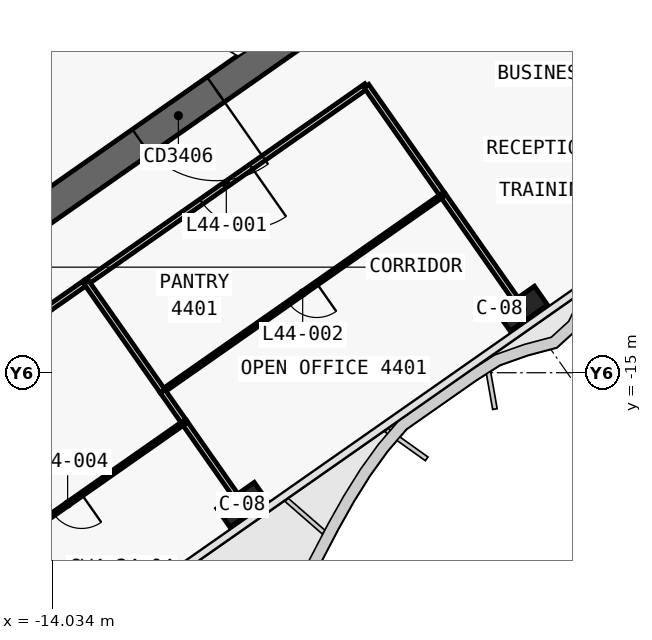
"""IFC4 building model, lengths in metres.
Left out: names, types, materials, properties, quantities, classifications, styles, units other than length and angle.
Written with IfcOpenShell. Run it as: python <this file> out.ifc"""

import sys

from ifc_helpers import new_model, si_unit, direction, frame, frame_2d, origin, origin_2d, place, context, subcontext, project, spatial, polyline, rectangle, outline, extrude, element, fill, save


model = new_model("IFC4")
c1 = context("Model", 3, precision=1e-05, world=origin(), true_north=direction((0.0, 1.0)))
c2 = subcontext(c1, "Body", "Model", "MODEL_VIEW")
j1 = project(units=[si_unit("LENGTHUNIT", "METRE"), si_unit("PLANEANGLEUNIT", "RADIAN")], contexts=[c1])
p1 = place(None, origin())
s1 = spatial("IfcSite", under=j1, at=p1, CompositionType="ELEMENT")
p2 = place(p1, origin())
s2 = spatial("IfcBuilding", under=s1, at=p2, CompositionType="ELEMENT")
p3 = place(p2, frame((0.0, 0.0, 190.5)))
s3 = spatial("IfcBuildingStorey", under=s2, at=p3, CompositionType="ELEMENT", Elevation=190.5)
p4 = place(p3, frame((0.029, 11.984, 0.0), z_axis=(0.0, 0.0, 1.0), x_axis=(-0.819151382952, -0.573577380837, 0.0)))
e1 = element("IfcWall", 1, at=p4, inside=s3, PredefinedType="SHEAR", context=c2, shape_type="SweptSolid", body=[
    extrude(outline(polyline([(33.898, 0.4), (0.56, 0.4), (-0.0, -0.4), (33.898, -0.4), (33.898, 0.4)])), origin(), (0.0, 0.0, 1.0), 3.9),
])
p5 = place(p3, frame((0.029, -0.712, 0.0), z_axis=(0.0, 0.0, 1.0), x_axis=(-0.819151758019, -0.573576845187, 0.0)))
e2 = element("IfcWall", 2, at=p5, inside=s3, PredefinedType="SHEAR", context=c2, shape_type="SweptSolid", body=[
    extrude(outline(polyline([(26.616, 0.4), (0.56, 0.4), (-0.0, -0.4), (26.616, -0.4), (26.616, 0.4)])), origin(), (0.0, 0.0, 1.0), 3.9),
])
p6 = place(p5, frame((2.966, 0.0, 0.0)))
e3 = element("IfcOpeningElement", 3, at=p6, cuts=e2, PredefinedType="OPENING", context=c2, shape_type="SweptSolid", body=[
    extrude(rectangle(XDim=2.4, YDim=2.1, at=frame_2d((1.2, 1.05))), frame((0.0, 0.41, 0.0), z_axis=(0.0, -1.0, 0.0), x_axis=(1.0, 0.0, 0.0)), (0.0, 0.0, 1.0), 0.82),
])
p7 = place(p5, frame((11.916, 0.0, 0.0)))
e4 = element("IfcOpeningElement", 4, at=p7, cuts=e2, PredefinedType="OPENING", context=c2, shape_type="SweptSolid", body=[
    extrude(rectangle(XDim=2.4, YDim=2.1, at=frame_2d((1.2, 1.05))), frame((0.0, 0.41, 0.0), z_axis=(0.0, -1.0, 0.0), x_axis=(1.0, 0.0, 0.0)), (0.0, 0.0, 1.0), 0.82),
])
p8 = place(p3, frame((-2.638, 3.768, 0.0), z_axis=(0.0, 0.0, 1.0), x_axis=(-0.81915267502, -0.573575535572, 0.0)))
e5 = element("IfcWall", 5, at=p8, inside=s3, PredefinedType="SHEAR", context=c2, shape_type="SweptSolid", body=[
    extrude(outline(polyline([(26.2, 0.2), (0.0, 0.2), (0.0, -0.2), (26.2, -0.2), (26.2, 0.2)])), origin(), (0.0, 0.0, 1.0), 3.9),
])
p9 = place(p8, frame((1.169, 0.0, 0.0)))
e6 = element("IfcOpeningElement", 6, at=p9, cuts=e5, PredefinedType="OPENING", context=c2, shape_type="SweptSolid", body=[
    extrude(rectangle(XDim=1.1, YDim=2.1, at=frame_2d((0.55, 1.05))), frame((0.0, 0.21, 0.0), z_axis=(0.0, -1.0, 0.0), x_axis=(1.0, 0.0, 0.0)), (0.0, 0.0, 1.0), 0.42),
])
p10 = place(p8, frame((3.206, 0.0, 0.0)))
e7 = element("IfcOpeningElement", 7, at=p10, cuts=e5, PredefinedType="OPENING", context=c2, shape_type="SweptSolid", body=[
    extrude(rectangle(XDim=1.1, YDim=2.1, at=frame_2d((0.55, 1.05))), frame((0.0, 0.21, 0.0), z_axis=(0.0, -1.0, 0.0), x_axis=(1.0, 0.0, 0.0)), (0.0, 0.0, 1.0), 0.42),
])
p11 = place(p8, frame((5.244, 0.0, 0.0)))
e8 = element("IfcOpeningElement", 8, at=p11, cuts=e5, PredefinedType="OPENING", context=c2, shape_type="SweptSolid", body=[
    extrude(rectangle(XDim=1.1, YDim=2.1, at=frame_2d((0.55, 1.05))), frame((0.0, 0.21, 0.0), z_axis=(0.0, -1.0, 0.0), x_axis=(1.0, 0.0, 0.0)), (0.0, 0.0, 1.0), 0.42),
])
p12 = place(p8, frame((7.281, 0.0, 0.0)))
e9 = element("IfcOpeningElement", 9, at=p12, cuts=e5, PredefinedType="OPENING", context=c2, shape_type="SweptSolid", body=[
    extrude(rectangle(XDim=1.1, YDim=2.1, at=frame_2d((0.55, 1.05))), frame((0.0, 0.21, 0.0), z_axis=(0.0, -1.0, 0.0), x_axis=(1.0, 0.0, 0.0)), (0.0, 0.0, 1.0), 0.42),
])
p13 = place(p8, frame((9.688, 0.0, 0.0)))
e10 = element("IfcOpeningElement", 10, at=p13, cuts=e5, PredefinedType="OPENING", context=c2, shape_type="SweptSolid", body=[
    extrude(rectangle(XDim=1.1, YDim=2.1, at=frame_2d((0.55, 1.05))), frame((0.0, 0.21, 0.0), z_axis=(0.0, -1.0, 0.0), x_axis=(1.0, 0.0, 0.0)), (0.0, 0.0, 1.0), 0.42),
])
p14 = place(p8, frame((11.863, 0.0, 0.0)))
e11 = element("IfcOpeningElement", 11, at=p14, cuts=e5, PredefinedType="OPENING", context=c2, shape_type="SweptSolid", body=[
    extrude(rectangle(XDim=1.1, YDim=2.1, at=frame_2d((0.55, 1.05))), frame((0.0, 0.21, 0.0), z_axis=(0.0, -1.0, 0.0), x_axis=(1.0, 0.0, 0.0)), (0.0, 0.0, 1.0), 0.42),
])
p15 = place(p8, frame((15.175, 0.0, 0.0)))
e12 = element("IfcOpeningElement", 12, at=p15, cuts=e5, PredefinedType="OPENING", context=c2, shape_type="SweptSolid", body=[
    extrude(rectangle(XDim=1.0, YDim=2.1, at=frame_2d((0.5, 1.05))), frame((0.0, 0.21, 0.0), z_axis=(0.0, -1.0, 0.0), x_axis=(1.0, 0.0, 0.0)), (0.0, 0.0, 1.0), 0.42),
])
for number, where, z_axis, x_axis in (
    (13, (-1.665, -13.313, 0.0), (0.0, 0.0, 1.0), (-0.819, -0.574, 0.0)),
    (14, (-9.038, -18.475, 0.0), (0.0, 0.0, 1.0), (-0.819, -0.574, 0.0)),
):
    element("IfcColumn", number, at=place(p3, frame(where, z_axis=z_axis, x_axis=x_axis)), inside=s3, PredefinedType="COLUMN", context=c2, shape_type="SweptSolid", body=[
        extrude(rectangle(XDim=1.2, YDim=0.6, at=origin_2d()), origin(), (0.0, 0.0, 1.0), 3.9),
    ])
p16 = place(p3, frame((-5.766, -7.456, 0.0), z_axis=(0.0, 0.0, 1.0), x_axis=(-0.81915291695, -0.57357519006, 0.0)))
e15 = element("IfcWall", 15, at=p16, inside=s3, PredefinedType="PARTITIONING", context=c2, shape_type="SweptSolid", body=[
    extrude(rectangle(XDim=9.002, YDim=0.15, at=frame_2d((4.501, 0.0))), origin(), (0.0, 0.0, 1.0), 3.0),
])
p17 = place(p16, frame((3.701, 0.0, 0.0)))
e16 = element("IfcOpeningElement", 16, at=p17, cuts=e15, PredefinedType="OPENING", context=c2, shape_type="SweptSolid", body=[
    extrude(rectangle(XDim=1.6, YDim=2.1, at=frame_2d((0.8, 1.05))), frame((0.0, 0.085, 0.0), z_axis=(0.0, -1.0, 0.0), x_axis=(1.0, 0.0, 0.0)), (0.0, 0.0, 1.0), 0.17),
])
p18 = place(p3, frame((-13.137, -12.617, 0.0), z_axis=(0.0, 0.0, 1.0), x_axis=(-0.819153958035, -0.573573703229, 0.0)))
e17 = element("IfcWall", 17, at=p18, inside=s3, PredefinedType="PARTITIONING", context=c2, shape_type="SweptSolid", body=[
    extrude(rectangle(XDim=7.504, YDim=0.15, at=frame_2d((3.752, 0.0))), origin(), (0.0, 0.0, 1.0), 3.0),
])
p19 = place(p18, frame((2.952, 0.0, 0.0)))
e18 = element("IfcOpeningElement", 18, at=p19, cuts=e17, PredefinedType="OPENING", context=c2, shape_type="SweptSolid", body=[
    extrude(rectangle(XDim=1.6, YDim=2.1, at=frame_2d((0.8, 1.05))), frame((0.0, 0.085, 0.0), z_axis=(0.0, -1.0, 0.0), x_axis=(1.0, 0.0, 0.0)), (0.0, 0.0, 1.0), 0.17),
])
p20 = place(p3, frame((-1.849, -13.051, 0.0), z_axis=(0.0, 0.0, 1.0), x_axis=(-0.573600070244, 0.819135495151, 0.0)))
e19 = element("IfcWall", 19, at=p20, inside=s3, PredefinedType="PARTITIONING", context=c2, shape_type="SweptSolid", body=[
    extrude(rectangle(XDim=3.331, YDim=0.15, at=frame_2d((1.666, 0.0))), origin(), (0.0, 0.0, 1.0), 3.0),
])
p21 = place(p3, frame((-3.758, -10.324, 0.0), z_axis=(0.0, 0.0, 1.0), x_axis=(-0.573560539213, 0.819163175355, 0.0)))
e20 = element("IfcWall", 20, at=p21, inside=s3, PredefinedType="PARTITIONING", context=c2, shape_type="SweptSolid", body=[
    extrude(rectangle(XDim=3.504, YDim=0.15, at=frame_2d((1.752, 0.0))), origin(), (0.0, 0.0, 1.0), 3.0),
])
p22 = place(p3, frame((-3.758, -10.324, 0.0), z_axis=(0.0, 0.0, 1.0), x_axis=(-0.819154173185, -0.573573395961, 0.0)))
e21 = element("IfcWall", 21, at=p22, inside=s3, PredefinedType="PARTITIONING", context=c2, shape_type="SweptSolid", body=[
    extrude(rectangle(XDim=9.0, YDim=0.1, at=frame_2d((4.5, 0.0))), origin(), (0.0, 0.0, 1.0), 3.0),
])
p23 = place(p22, frame((4.05, 0.0, 0.0)))
e22 = element("IfcOpeningElement", 22, at=p23, cuts=e21, PredefinedType="OPENING", context=c2, shape_type="SweptSolid", body=[
    extrude(rectangle(XDim=0.9, YDim=2.1, at=frame_2d((0.45, 1.05))), frame((0.0, 0.06, 0.0), z_axis=(0.0, -1.0, 0.0), x_axis=(1.0, 0.0, 0.0)), (0.0, 0.0, 1.0), 0.12),
])
p24 = place(p3, frame((-9.221, -18.213, 0.0), z_axis=(0.0, 0.0, 1.0), x_axis=(-0.573553724287, 0.819167946978, 0.0)))
e23 = element("IfcWall", 23, at=p24, inside=s3, PredefinedType="PARTITIONING", context=c2, shape_type="SweptSolid", body=[
    extrude(rectangle(XDim=2.331, YDim=0.15, at=frame_2d((1.166, 0.0))), origin(), (0.0, 0.0, 1.0), 3.0),
])
p25 = place(p3, frame((-10.556, -16.306, 0.0), z_axis=(0.0, 0.0, 1.0), x_axis=(-0.573576907489, 0.819151714394, 0.0)))
e24 = element("IfcWall", 24, at=p25, inside=s3, PredefinedType="PARTITIONING", context=c2, shape_type="SweptSolid", body=[
    extrude(rectangle(XDim=1.001, YDim=0.15, at=frame_2d((0.5, 0.0))), origin(), (0.0, 0.0, 1.0), 3.0),
])
p26 = place(p3, frame((-11.131, -15.485, 0.0), z_axis=(0.0, 0.0, 1.0), x_axis=(-0.573565328398, 0.819159822049, 0.0)))
e25 = element("IfcWall", 25, at=p26, inside=s3, PredefinedType="PARTITIONING", context=c2, shape_type="SweptSolid", body=[
    extrude(rectangle(XDim=3.5, YDim=0.15, at=frame_2d((1.75, 0.0))), origin(), (0.0, 0.0, 1.0), 3.0),
])
p27 = place(p3, frame((-10.557, -16.305, 0.0), z_axis=(0.0, 0.0, 1.0), x_axis=(-0.81915238829, -0.573575945067, 0.0)))
e26 = element("IfcWall", 26, at=p27, inside=s3, PredefinedType="PARTITIONING", context=c2, shape_type="SweptSolid", body=[
    extrude(rectangle(XDim=7.5, YDim=0.1, at=frame_2d((3.75, 0.0))), origin(), (0.0, 0.0, 1.0), 3.0),
])
p28 = place(p27, frame((3.3, 0.0, 0.0)))
e27 = element("IfcOpeningElement", 27, at=p28, cuts=e26, PredefinedType="OPENING", context=c2, shape_type="SweptSolid", body=[
    extrude(rectangle(XDim=0.9, YDim=2.1, at=frame_2d((0.45, 1.05))), frame((0.0, 0.06, 0.0), z_axis=(0.0, -1.0, 0.0), x_axis=(1.0, 0.0, 0.0)), (0.0, 0.0, 1.0), 0.12),
])
p29 = place(p7, origin())
e28 = element("IfcDoor", 28, at=p29, inside=s3, OperationType="DOUBLE_DOOR_SINGLE_SWING", PredefinedType="DOOR", context=c2, shape_type="SweptSolid", body=[
    extrude(rectangle(XDim=2.4, YDim=2.1, at=frame_2d((1.2, 1.05))), frame((0.0, 0.025, 0.0), z_axis=(0.0, -1.0, 0.0), x_axis=(1.0, 0.0, 0.0)), (0.0, 0.0, 1.0), 0.05),
])
fill(e4, e28)
p30 = place(p17, origin())
e29 = element("IfcDoor", 29, at=p30, inside=s3, OperationType="DOUBLE_DOOR_SINGLE_SWING", PredefinedType="DOOR", context=c2, shape_type="SweptSolid", body=[
    extrude(rectangle(XDim=1.6, YDim=2.1, at=frame_2d((0.8, 1.05))), frame((0.0, 0.025, 0.0), z_axis=(0.0, -1.0, 0.0), x_axis=(1.0, 0.0, 0.0)), (0.0, 0.0, 1.0), 0.05),
])
fill(e16, e29)
p31 = place(p23, origin())
e30 = element("IfcDoor", 30, at=p31, inside=s3, OperationType="SINGLE_SWING_LEFT", PredefinedType="DOOR", context=c2, shape_type="SweptSolid", body=[
    extrude(rectangle(XDim=0.9, YDim=2.1, at=frame_2d((0.45, 1.05))), frame((0.0, 0.025, 0.0), z_axis=(0.0, -1.0, 0.0), x_axis=(1.0, 0.0, 0.0)), (0.0, 0.0, 1.0), 0.05),
])
fill(e22, e30)
p32 = place(p28, origin())
e31 = element("IfcDoor", 31, at=p32, inside=s3, OperationType="SINGLE_SWING_RIGHT", PredefinedType="DOOR", context=c2, shape_type="SweptSolid", body=[
    extrude(rectangle(XDim=0.9, YDim=2.1, at=frame_2d((0.45, 1.05))), frame((0.0, 0.025, 0.0), z_axis=(0.0, -1.0, 0.0), x_axis=(1.0, 0.0, 0.0)), (0.0, 0.0, 1.0), 0.05),
])
fill(e27, e31)
save(model, sys.argv[1])
